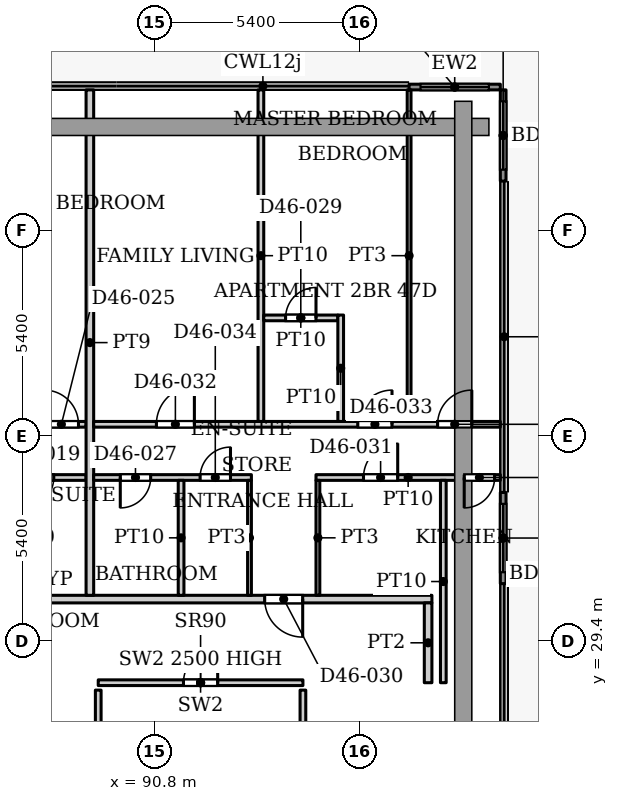
"""IFC4 building model, lengths in metres.
Left out: names, types, materials, properties, quantities, classifications, styles, units other than length and angle.
Written with IfcOpenShell. Run it as: python <this file> out.ifc"""

import sys

from ifc_helpers import new_model, si_unit, direction, frame, frame_2d, origin, place, context, subcontext, project, spatial, rectangle, extrude, source, transform, mapped, element, fill, save


model = new_model("IFC4")
c1 = context("Model", 3, precision=1e-05, world=origin(), true_north=direction((0.0, 1.0)))
c2 = subcontext(c1, "Body", "Model", "MODEL_VIEW")
j1 = project(units=[si_unit("LENGTHUNIT", "METRE"), si_unit("PLANEANGLEUNIT", "RADIAN")], contexts=[c1])
p1 = place(None, origin())
s1 = spatial("IfcSite", under=j1, at=p1, CompositionType="ELEMENT")
p2 = place(p1, origin())
s2 = spatial("IfcBuilding", under=s1, at=p2, CompositionType="ELEMENT")
p3 = place(p2, frame((0.0, 0.0, 199.4)))
s3 = spatial("IfcBuildingStorey", under=s2, at=p3, CompositionType="ELEMENT", Elevation=199.4)
p4 = place(p3, frame((97.5, 43.975, 0.0), z_axis=(0.0, 0.0, 1.0), x_axis=(1.0, 0.0, 0.0)))
e1 = element("IfcWall", 1, at=p4, inside=s3, PredefinedType="SOLIDWALL", context=c2, shape_type="SweptSolid", body=[
    extrude(rectangle(XDim=2.4, YDim=0.15, at=frame_2d((1.2, 0.0))), origin(), (0.0, 0.0, 1.0), 3.75),
])
p5 = place(p4, frame((0.3, 0.0, 0.0)))
e2 = element("IfcOpeningElement", 2, at=p5, cuts=e1, PredefinedType="OPENING", context=c2, shape_type="SweptSolid", body=[
    extrude(rectangle(XDim=1.8, YDim=2.4, at=frame_2d((0.9, 1.2))), frame((0.0, 0.085, 0.0), z_axis=(0.0, -1.0, 0.0), x_axis=(1.0, 0.0, 0.0)), (0.0, 0.0, 1.0), 0.17),
])
p6 = place(p3, frame((99.975, 43.9, 0.0), z_axis=(0.0, 0.0, 1.0), x_axis=(0.0, -1.0, 0.0)))
e3 = element("IfcWall", 3, at=p6, inside=s3, PredefinedType="SOLIDWALL", context=c2, shape_type="SweptSolid", body=[
    extrude(rectangle(XDim=2.4, YDim=0.15, at=frame_2d((1.2, 0.0))), origin(), (0.0, 0.0, 1.0), 3.75),
])
p7 = place(p6, frame((0.3, 0.0, 0.0)))
e4 = element("IfcOpeningElement", 4, at=p7, cuts=e3, PredefinedType="OPENING", context=c2, shape_type="SweptSolid", body=[
    extrude(rectangle(XDim=1.8, YDim=2.4, at=frame_2d((0.9, 1.2))), frame((0.0, 0.085, 0.0), z_axis=(0.0, -1.0, 0.0), x_axis=(1.0, 0.0, 0.0)), (0.0, 0.0, 1.0), 0.17),
])
p8 = place(p3, frame((99.975, 33.307, 0.0), z_axis=(0.0, 0.0, 1.0), x_axis=(0.0, -1.0, 0.0)))
e5 = element("IfcWall", 5, at=p8, inside=s3, PredefinedType="SOLIDWALL", context=c2, shape_type="SweptSolid", body=[
    extrude(rectangle(XDim=2.4, YDim=0.15, at=frame_2d((1.2, 0.0))), origin(), (0.0, 0.0, 1.0), 3.75),
])
p9 = place(p8, frame((0.3, 0.0, 0.0)))
e6 = element("IfcOpeningElement", 6, at=p9, cuts=e5, PredefinedType="OPENING", context=c2, shape_type="SweptSolid", body=[
    extrude(rectangle(XDim=1.8, YDim=2.4, at=frame_2d((0.9, 1.2))), frame((0.0, 0.085, 0.0), z_axis=(0.0, -1.0, 0.0), x_axis=(1.0, 0.0, 0.0)), (0.0, 0.0, 1.0), 0.17),
])
p10 = place(p3, frame((89.32, 28.3, 0.0), z_axis=(0.0, 0.0, 1.0), x_axis=(1.0, 0.0, 0.0)))
e7 = element("IfcWall", 7, at=p10, inside=s3, PredefinedType="PARTITIONING", context=c2, shape_type="SweptSolid", body=[
    extrude(rectangle(XDim=5.386, YDim=0.15, at=frame_2d((2.693, 0.0))), origin(), (0.0, 0.0, 1.0), 2.5),
])
p11 = place(p10, frame((2.243, 0.0, 0.0)))
e8 = element("IfcOpeningElement", 8, at=p11, cuts=e7, PredefinedType="OPENING", context=c2, shape_type="SweptSolid", body=[
    extrude(rectangle(XDim=0.9, YDim=2.2, at=frame_2d((0.45, 1.1))), frame((0.0, 0.085, 0.0), z_axis=(0.0, -1.0, 0.0), x_axis=(1.0, 0.0, 0.0)), (0.0, 0.0, 1.0), 0.17),
])
p12 = place(p3, frame((89.32, 25.62, 0.0), z_axis=(0.0, 0.0, 1.0), x_axis=(0.0, 1.0, 0.0)))
e9 = element("IfcWall", 9, at=p12, inside=s3, PredefinedType="PARTITIONING", context=c2, shape_type="SweptSolid", body=[
    extrude(rectangle(XDim=2.485, YDim=0.15, at=frame_2d((1.242, 0.0))), origin(), (0.0, 0.0, 1.0), 3.9),
])
p13 = place(p3, frame((94.706, 21.287, 0.0), z_axis=(0.0, 0.0, 1.0), x_axis=(0.0, 1.0, 0.0)))
e10 = element("IfcWall", 10, at=p13, inside=s3, PredefinedType="PARTITIONING", context=c2, shape_type="SweptSolid", body=[
    extrude(rectangle(XDim=6.818, YDim=0.15, at=frame_2d((3.409, 0.0))), origin(), (0.0, 0.0, 1.0), 3.9),
])
p14 = place(p3, frame((53.549, 30.5, 0.0), z_axis=(0.0, 0.0, 1.0), x_axis=(1.0, 0.0, 0.0)))
e11 = element("IfcWall", 11, at=p14, inside=s3, PredefinedType="PARTITIONING", context=c2, shape_type="SweptSolid", body=[
    extrude(rectangle(XDim=44.551, YDim=0.2, at=frame_2d((22.275, 0.0))), origin(), (0.0, 0.0, 1.0), 3.6),
])
p15 = place(p14, frame((5.501, 0.0, 0.0)))
e12 = element("IfcOpeningElement", 12, at=p15, cuts=e11, PredefinedType="OPENING", context=c2, shape_type="SweptSolid", body=[
    extrude(rectangle(XDim=1.0, YDim=2.1, at=frame_2d((0.5, 1.05))), frame((0.0, 0.11, 0.0), z_axis=(0.0, -1.0, 0.0), x_axis=(1.0, 0.0, 0.0)), (0.0, 0.0, 1.0), 0.22),
])
p16 = place(p14, frame((20.201, 0.0, 0.0)))
e13 = element("IfcOpeningElement", 13, at=p16, cuts=e11, PredefinedType="OPENING", context=c2, shape_type="SweptSolid", body=[
    extrude(rectangle(XDim=1.0, YDim=2.1, at=frame_2d((0.5, 1.05))), frame((0.0, 0.11, 0.0), z_axis=(0.0, -1.0, 0.0), x_axis=(1.0, 0.0, 0.0)), (0.0, 0.0, 1.0), 0.22),
])
p17 = place(p14, frame((24.251, 0.0, 0.0)))
e14 = element("IfcOpeningElement", 14, at=p17, cuts=e11, PredefinedType="OPENING", context=c2, shape_type="SweptSolid", body=[
    extrude(rectangle(XDim=1.0, YDim=2.1, at=frame_2d((0.5, 1.05))), frame((0.0, 0.11, 0.0), z_axis=(0.0, -1.0, 0.0), x_axis=(1.0, 0.0, 0.0)), (0.0, 0.0, 1.0), 0.22),
])
p18 = place(p14, frame((40.151, 0.0, 0.0)))
e15 = element("IfcOpeningElement", 15, at=p18, cuts=e11, PredefinedType="OPENING", context=c2, shape_type="SweptSolid", body=[
    extrude(rectangle(XDim=1.0, YDim=2.1, at=frame_2d((0.5, 1.05))), frame((0.0, 0.11, 0.0), z_axis=(0.0, -1.0, 0.0), x_axis=(1.0, 0.0, 0.0)), (0.0, 0.0, 1.0), 0.22),
])
p19 = place(p3, frame((77.2, 35.1, 0.0), z_axis=(0.0, 0.0, 1.0), x_axis=(1.0, 0.0, 0.0)))
e16 = element("IfcWall", 16, at=p19, inside=s3, PredefinedType="PARTITIONING", context=c2, shape_type="SweptSolid", body=[
    extrude(rectangle(XDim=11.8, YDim=0.15, at=frame_2d((5.9, 0.0))), origin(), (0.0, 0.0, 1.0), 3.6),
])
p20 = place(p19, frame((6.2, 0.0, 0.0)))
e17 = element("IfcOpeningElement", 17, at=p20, cuts=e16, PredefinedType="OPENING", context=c2, shape_type="SweptSolid", body=[
    extrude(rectangle(XDim=0.9, YDim=2.1, at=frame_2d((0.45, 1.05))), frame((0.0, 0.085, 0.0), z_axis=(0.0, -1.0, 0.0), x_axis=(1.0, 0.0, 0.0)), (0.0, 0.0, 1.0), 0.17),
])
p21 = place(p19, frame((1.95, 0.0, 0.0)))
e18 = element("IfcOpeningElement", 18, at=p21, cuts=e16, PredefinedType="OPENING", context=c2, shape_type="SweptSolid", body=[
    extrude(rectangle(XDim=1.0, YDim=2.1, at=frame_2d((0.5, 1.05))), frame((0.0, 0.085, 0.0), z_axis=(0.0, -1.0, 0.0), x_axis=(1.0, 0.0, 0.0)), (0.0, 0.0, 1.0), 0.17),
])
p22 = place(p19, frame((10.7, 0.0, 0.0)))
e19 = element("IfcOpeningElement", 19, at=p22, cuts=e16, PredefinedType="OPENING", context=c2, shape_type="SweptSolid", body=[
    extrude(rectangle(XDim=0.9, YDim=2.1, at=frame_2d((0.45, 1.05))), frame((0.0, 0.085, 0.0), z_axis=(0.0, -1.0, 0.0), x_axis=(1.0, 0.0, 0.0)), (0.0, 0.0, 1.0), 0.17),
])
p23 = place(p3, frame((80.05, 33.7, 0.0), z_axis=(0.0, 0.0, 1.0), x_axis=(1.0, 0.0, 0.0)))
e20 = element("IfcWall", 20, at=p23, inside=s3, PredefinedType="PARTITIONING", context=c2, shape_type="SweptSolid", body=[
    extrude(rectangle(XDim=8.95, YDim=0.15, at=frame_2d((4.475, 0.0))), origin(), (0.0, 0.0, 1.0), 3.6),
])
p24 = place(p23, frame((7.3, 0.0, 0.0)))
e21 = element("IfcOpeningElement", 21, at=p24, cuts=e20, PredefinedType="OPENING", context=c2, shape_type="SweptSolid", body=[
    extrude(rectangle(XDim=0.8, YDim=2.1, at=frame_2d((0.4, 1.05))), frame((0.0, 0.085, 0.0), z_axis=(0.0, -1.0, 0.0), x_axis=(1.0, 0.0, 0.0)), (0.0, 0.0, 1.0), 0.17),
])
p25 = place(p23, frame((1.6, 0.0, 0.0)))
e22 = element("IfcOpeningElement", 22, at=p25, cuts=e20, PredefinedType="OPENING", context=c2, shape_type="SweptSolid", body=[
    extrude(rectangle(XDim=0.9, YDim=2.1, at=frame_2d((0.45, 1.05))), frame((0.0, 0.085, 0.0), z_axis=(0.0, -1.0, 0.0), x_axis=(1.0, 0.0, 0.0)), (0.0, 0.0, 1.0), 0.17),
])
p26 = place(p23, frame((4.9, 0.0, 0.0)))
e23 = element("IfcOpeningElement", 23, at=p26, cuts=e20, PredefinedType="OPENING", context=c2, shape_type="SweptSolid", body=[
    extrude(rectangle(XDim=0.8, YDim=2.1, at=frame_2d((0.4, 1.05))), frame((0.0, 0.085, 0.0), z_axis=(0.0, -1.0, 0.0), x_axis=(1.0, 0.0, 0.0)), (0.0, 0.0, 1.0), 0.17),
])
p27 = place(p3, frame((89.1, 30.6, 0.0), z_axis=(0.0, 0.0, 1.0), x_axis=(0.0, 1.0, 0.0)))
e24 = element("IfcWall", 24, at=p27, inside=s3, PredefinedType="PARTITIONING", context=c2, shape_type="SweptSolid", body=[
    extrude(rectangle(XDim=13.3, YDim=0.2, at=frame_2d((6.65, 0.0))), origin(), (0.0, 0.0, 1.0), 3.6),
])
p28 = place(p3, frame((89.2, 33.7, 0.0), z_axis=(0.0, 0.0, 1.0), x_axis=(1.0, 0.0, 0.0)))
e25 = element("IfcWall", 25, at=p28, inside=s3, PredefinedType="PARTITIONING", context=c2, shape_type="SweptSolid", body=[
    extrude(rectangle(XDim=4.15, YDim=0.15, at=frame_2d((2.075, 0.0))), origin(), (0.0, 0.0, 1.0), 3.6),
])
p29 = place(p28, frame((0.7, 0.0, 0.0)))
e26 = element("IfcOpeningElement", 26, at=p29, cuts=e25, PredefinedType="OPENING", context=c2, shape_type="SweptSolid", body=[
    extrude(rectangle(XDim=0.8, YDim=2.1, at=frame_2d((0.4, 1.05))), frame((0.0, 0.085, 0.0), z_axis=(0.0, -1.0, 0.0), x_axis=(1.0, 0.0, 0.0)), (0.0, 0.0, 1.0), 0.17),
])
p30 = place(p28, frame((2.8, 0.0, 0.0)))
e27 = element("IfcOpeningElement", 27, at=p30, cuts=e25, PredefinedType="OPENING", context=c2, shape_type="SweptSolid", body=[
    extrude(rectangle(XDim=0.8, YDim=2.1, at=frame_2d((0.4, 1.05))), frame((0.0, 0.085, 0.0), z_axis=(0.0, -1.0, 0.0), x_axis=(1.0, 0.0, 0.0)), (0.0, 0.0, 1.0), 0.17),
])
p31 = place(p3, frame((89.2, 35.1, 0.0), z_axis=(0.0, 0.0, 1.0), x_axis=(1.0, 0.0, 0.0)))
e28 = element("IfcWall", 28, at=p31, inside=s3, PredefinedType="PARTITIONING", context=c2, shape_type="SweptSolid", body=[
    extrude(rectangle(XDim=10.7, YDim=0.15, at=frame_2d((5.35, 0.0))), origin(), (0.0, 0.0, 1.0), 3.6),
])
p32 = place(p31, frame((9.05, 0.0, 0.0)))
e29 = element("IfcOpeningElement", 29, at=p32, cuts=e28, PredefinedType="OPENING", context=c2, shape_type="SweptSolid", body=[
    extrude(rectangle(XDim=0.9, YDim=2.1, at=frame_2d((0.45, 1.05))), frame((0.0, 0.085, 0.0), z_axis=(0.0, -1.0, 0.0), x_axis=(1.0, 0.0, 0.0)), (0.0, 0.0, 1.0), 0.17),
])
p33 = place(p31, frame((1.65, 0.0, 0.0)))
e30 = element("IfcOpeningElement", 30, at=p33, cuts=e28, PredefinedType="OPENING", context=c2, shape_type="SweptSolid", body=[
    extrude(rectangle(XDim=1.0, YDim=2.1, at=frame_2d((0.5, 1.05))), frame((0.0, 0.085, 0.0), z_axis=(0.0, -1.0, 0.0), x_axis=(1.0, 0.0, 0.0)), (0.0, 0.0, 1.0), 0.17),
])
p34 = place(p31, frame((6.95, 0.0, 0.0)))
e31 = element("IfcOpeningElement", 31, at=p34, cuts=e28, PredefinedType="OPENING", context=c2, shape_type="SweptSolid", body=[
    extrude(rectangle(XDim=0.9, YDim=2.1, at=frame_2d((0.45, 1.05))), frame((0.0, 0.085, 0.0), z_axis=(0.0, -1.0, 0.0), x_axis=(1.0, 0.0, 0.0)), (0.0, 0.0, 1.0), 0.17),
])
p35 = place(p3, frame((91.5, 30.6, 0.0), z_axis=(0.0, 0.0, 1.0), x_axis=(0.0, 1.0, 0.0)))
e32 = element("IfcWall", 32, at=p35, inside=s3, PredefinedType="PARTITIONING", context=c2, shape_type="SweptSolid", body=[
    extrude(rectangle(XDim=3.025, YDim=0.15, at=frame_2d((1.512, 0.0))), origin(), (0.0, 0.0, 1.0), 3.6),
])
p36 = place(p3, frame((93.3, 30.6, 0.0), z_axis=(0.0, 0.0, 1.0), x_axis=(0.0, 1.0, 0.0)))
e33 = element("IfcWall", 33, at=p36, inside=s3, PredefinedType="PARTITIONING", context=c2, shape_type="SweptSolid", body=[
    extrude(rectangle(XDim=3.025, YDim=0.1, at=frame_2d((1.512, 0.0))), origin(), (0.0, 0.0, 1.0), 3.6),
])
p37 = place(p3, frame((93.6, 35.175, 0.0), z_axis=(0.0, 0.0, 1.0), x_axis=(0.0, 1.0, 0.0)))
e34 = element("IfcWall", 34, at=p37, inside=s3, PredefinedType="PARTITIONING", context=c2, shape_type="SweptSolid", body=[
    extrude(rectangle(XDim=8.725, YDim=0.15, at=frame_2d((4.362, 0.0))), origin(), (0.0, 0.0, 1.0), 3.6),
])
p38 = place(p3, frame((93.675, 37.9, 0.0), z_axis=(0.0, 0.0, 1.0), x_axis=(1.0, 0.0, 0.0)))
e35 = element("IfcWall", 35, at=p38, inside=s3, PredefinedType="PARTITIONING", context=c2, shape_type="SweptSolid", body=[
    extrude(rectangle(XDim=1.95, YDim=0.15, at=frame_2d((0.975, 0.0))), origin(), (0.0, 0.0, 1.0), 3.6),
])
p39 = place(p38, frame((0.575, 0.0, 0.0)))
e36 = element("IfcOpeningElement", 36, at=p39, cuts=e35, PredefinedType="OPENING", context=c2, shape_type="SweptSolid", body=[
    extrude(rectangle(XDim=0.8, YDim=2.1, at=frame_2d((0.4, 1.05))), frame((0.0, 0.085, 0.0), z_axis=(0.0, -1.0, 0.0), x_axis=(1.0, 0.0, 0.0)), (0.0, 0.0, 1.0), 0.17),
])
p40 = place(p3, frame((95.05, 33.7, 0.0), z_axis=(0.0, 0.0, 1.0), x_axis=(1.0, 0.0, 0.0)))
e37 = element("IfcWall", 37, at=p40, inside=s3, PredefinedType="PARTITIONING", context=c2, shape_type="SweptSolid", body=[
    extrude(rectangle(XDim=4.85, YDim=0.15, at=frame_2d((2.425, 0.0))), origin(), (0.0, 0.0, 1.0), 3.6),
])
p41 = place(p40, frame((1.25, 0.0, 0.0)))
e38 = element("IfcOpeningElement", 38, at=p41, cuts=e37, PredefinedType="OPENING", context=c2, shape_type="SweptSolid", body=[
    extrude(rectangle(XDim=0.9, YDim=2.1, at=frame_2d((0.45, 1.05))), frame((0.0, 0.085, 0.0), z_axis=(0.0, -1.0, 0.0), x_axis=(1.0, 0.0, 0.0)), (0.0, 0.0, 1.0), 0.17),
])
p42 = place(p40, frame((3.9, 0.0, 0.0)))
e39 = element("IfcOpeningElement", 39, at=p42, cuts=e37, PredefinedType="OPENING", context=c2, shape_type="SweptSolid", body=[
    extrude(rectangle(XDim=0.8, YDim=2.1, at=frame_2d((0.4, 1.05))), frame((0.0, 0.085, 0.0), z_axis=(0.0, -1.0, 0.0), x_axis=(1.0, 0.0, 0.0)), (0.0, 0.0, 1.0), 0.17),
])
p43 = place(p3, frame((95.1, 30.6, 0.0), z_axis=(0.0, 0.0, 1.0), x_axis=(0.0, 1.0, 0.0)))
e40 = element("IfcWall", 40, at=p43, inside=s3, PredefinedType="PARTITIONING", context=c2, shape_type="SweptSolid", body=[
    extrude(rectangle(XDim=3.025, YDim=0.1, at=frame_2d((1.512, 0.0))), origin(), (0.0, 0.0, 1.0), 3.6),
])
p44 = place(p3, frame((95.7, 35.175, 0.0), z_axis=(0.0, 0.0, 1.0), x_axis=(0.0, 1.0, 0.0)))
e41 = element("IfcWall", 41, at=p44, inside=s3, PredefinedType="PARTITIONING", context=c2, shape_type="SweptSolid", body=[
    extrude(rectangle(XDim=2.8, YDim=0.15, at=frame_2d((1.4, 0.0))), origin(), (0.0, 0.0, 1.0), 3.6),
])
p45 = place(p3, frame((97.5, 35.175, 0.0), z_axis=(0.0, 0.0, 1.0), x_axis=(0.0, 1.0, 0.0)))
e42 = element("IfcWall", 42, at=p45, inside=s3, PredefinedType="PARTITIONING", context=c2, shape_type="SweptSolid", body=[
    extrude(rectangle(XDim=8.725, YDim=0.1, at=frame_2d((4.362, 0.0))), origin(), (0.0, 0.0, 1.0), 3.6),
])
p46 = place(p3, frame((98.0, 28.3, 0.0), z_axis=(0.0, 0.0, 1.0), x_axis=(0.0, 1.0, 0.0)))
e43 = element("IfcWall", 43, at=p46, inside=s3, PredefinedType="PARTITIONING", context=c2, shape_type="SweptSolid", body=[
    extrude(rectangle(XDim=2.1, YDim=0.2, at=frame_2d((1.05, 0.0))), origin(), (0.0, 0.0, 1.0), 3.6),
])
p47 = place(p3, frame((98.4, 28.3, 0.0), z_axis=(0.0, 0.0, 1.0), x_axis=(0.0, 1.0, 0.0)))
e44 = element("IfcWall", 44, at=p47, inside=s3, PredefinedType="PARTITIONING", context=c2, shape_type="SweptSolid", body=[
    extrude(rectangle(XDim=5.325, YDim=0.15, at=frame_2d((2.663, 0.0))), origin(), (0.0, 0.0, 1.0), 3.6),
])
m1 = source(origin(), c2, "Body", "SweptSolid", [
    extrude(rectangle(XDim=1.8, YDim=2.4, at=frame_2d((0.9, 1.2))), frame((0.0, 0.025, 0.0), z_axis=(0.0, -1.0, 0.0), x_axis=(1.0, 0.0, 0.0)), (0.0, 0.0, 1.0), 0.05),
])
p48 = place(p5, origin())
e45 = element("IfcDoor", 45, at=p48, inside=s3, OperationType="SLIDING_TO_LEFT", PredefinedType="DOOR", context=c2, shape_type="MappedRepresentation", body=[
    mapped(m1, transform((0.0, 0.0, 0.0), x_axis=(1.0, 0.0, 0.0), y_axis=(0.0, 1.0, 0.0), z_axis=(0.0, 0.0, 1.0), scale=1.0)),
])
fill(e2, e45)
p49 = place(p7, origin())
e46 = element("IfcDoor", 46, at=p49, inside=s3, OperationType="SLIDING_TO_LEFT", PredefinedType="DOOR", context=c2, shape_type="MappedRepresentation", body=[
    mapped(m1, transform((0.0, 0.0, 0.0), x_axis=(1.0, 0.0, 0.0), y_axis=(0.0, 1.0, 0.0), z_axis=(0.0, 0.0, 1.0), scale=1.0)),
])
fill(e4, e46)
p50 = place(p9, origin())
e47 = element("IfcDoor", 47, at=p50, inside=s3, OperationType="SLIDING_TO_LEFT", PredefinedType="DOOR", context=c2, shape_type="MappedRepresentation", body=[
    mapped(m1, transform((0.0, 0.0, 0.0), x_axis=(1.0, 0.0, 0.0), y_axis=(0.0, 1.0, 0.0), z_axis=(0.0, 0.0, 1.0), scale=1.0)),
])
fill(e6, e47)
m2 = source(origin(), c2, "Body", "SweptSolid", [
    extrude(rectangle(XDim=0.9, YDim=2.2, at=frame_2d((0.45, 1.1))), frame((0.0, 0.025, 0.0), z_axis=(0.0, -1.0, 0.0), x_axis=(1.0, 0.0, 0.0)), (0.0, 0.0, 1.0), 0.05),
])
p51 = place(p11, origin())
e48 = element("IfcDoor", 48, at=p51, inside=s3, OperationType="SINGLE_SWING_LEFT", PredefinedType="DOOR", context=c2, shape_type="MappedRepresentation", body=[
    mapped(m2, transform((0.0, 0.0, 0.0), x_axis=(1.0, 0.0, 0.0), y_axis=(0.0, 1.0, 0.0), z_axis=(0.0, 0.0, 1.0), scale=1.0)),
])
fill(e8, e48)
m3 = source(origin(), c2, "Body", "SweptSolid", [
    extrude(rectangle(XDim=0.8, YDim=2.1, at=frame_2d((0.4, 1.05))), frame((0.0, 0.025, 0.0), z_axis=(0.0, -1.0, 0.0), x_axis=(1.0, 0.0, 0.0)), (0.0, 0.0, 1.0), 0.05),
])
p52 = place(p24, origin())
e49 = element("IfcDoor", 49, at=p52, inside=s3, OperationType="SINGLE_SWING_RIGHT", PredefinedType="DOOR", context=c2, shape_type="MappedRepresentation", body=[
    mapped(m3, transform((0.0, 0.0, 0.0), x_axis=(1.0, 0.0, 0.0), y_axis=(0.0, 1.0, 0.0), z_axis=(0.0, 0.0, 1.0), scale=1.0)),
])
fill(e21, e49)
m4 = source(origin(), c2, "Body", "SweptSolid", [
    extrude(rectangle(XDim=0.9, YDim=2.1, at=frame_2d((0.45, 1.05))), frame((0.0, 0.025, 0.0), z_axis=(0.0, -1.0, 0.0), x_axis=(1.0, 0.0, 0.0)), (0.0, 0.0, 1.0), 0.05),
])
p53 = place(p22, origin())
e50 = element("IfcDoor", 50, at=p53, inside=s3, OperationType="SINGLE_SWING_LEFT", PredefinedType="DOOR", context=c2, shape_type="MappedRepresentation", body=[
    mapped(m4, transform((0.0, 0.0, 0.0), x_axis=(1.0, 0.0, 0.0), y_axis=(0.0, 1.0, 0.0), z_axis=(0.0, 0.0, 1.0), scale=1.0)),
])
fill(e19, e50)
p54 = place(p29, origin())
e51 = element("IfcDoor", 51, at=p54, inside=s3, OperationType="SINGLE_SWING_RIGHT", PredefinedType="DOOR", context=c2, shape_type="MappedRepresentation", body=[
    mapped(m3, transform((0.0, 0.0, 0.0), x_axis=(1.0, 0.0, 0.0), y_axis=(0.0, 1.0, 0.0), z_axis=(0.0, 0.0, 1.0), scale=1.0)),
])
fill(e26, e51)
p55 = place(p32, origin())
e52 = element("IfcDoor", 52, at=p55, inside=s3, OperationType="SINGLE_SWING_LEFT", PredefinedType="DOOR", context=c2, shape_type="MappedRepresentation", body=[
    mapped(m4, transform((0.0, 0.0, 0.0), x_axis=(1.0, 0.0, 0.0), y_axis=(0.0, 1.0, 0.0), z_axis=(0.0, 0.0, 1.0), scale=1.0)),
])
fill(e29, e52)
p56 = place(p39, origin())
e53 = element("IfcDoor", 53, at=p56, inside=s3, OperationType="SINGLE_SWING_LEFT", PredefinedType="DOOR", context=c2, shape_type="MappedRepresentation", body=[
    mapped(m3, transform((0.0, 0.0, 0.0), x_axis=(1.0, 0.0, 0.0), y_axis=(0.0, 1.0, 0.0), z_axis=(0.0, 0.0, 1.0), scale=1.0)),
])
fill(e36, e53)
m5 = source(origin(), c2, "Body", "SweptSolid", [
    extrude(rectangle(XDim=1.0, YDim=2.1, at=frame_2d((0.5, 1.05))), frame((0.0, 0.025, 0.0), z_axis=(0.0, -1.0, 0.0), x_axis=(1.0, 0.0, 0.0)), (0.0, 0.0, 1.0), 0.05),
])
p57 = place(p18, origin())
e54 = element("IfcDoor", 54, at=p57, inside=s3, OperationType="SINGLE_SWING_RIGHT", PredefinedType="DOOR", context=c2, shape_type="MappedRepresentation", body=[
    mapped(m5, transform((0.0, 0.0, 0.0), x_axis=(1.0, 0.0, 0.0), y_axis=(0.0, 1.0, 0.0), z_axis=(0.0, 0.0, 1.0), scale=1.0)),
])
fill(e15, e54)
p58 = place(p41, origin())
e55 = element("IfcDoor", 55, at=p58, inside=s3, OperationType="SINGLE_SWING_LEFT", PredefinedType="DOOR", context=c2, shape_type="MappedRepresentation", body=[
    mapped(m4, transform((0.0, 0.0, 0.0), x_axis=(1.0, 0.0, 0.0), y_axis=(0.0, 1.0, 0.0), z_axis=(0.0, 0.0, 1.0), scale=1.0)),
])
fill(e38, e55)
m6 = source(origin(), c2, "Body", "SweptSolid", [
    extrude(rectangle(XDim=1.0, YDim=2.1, at=frame_2d((0.5, 1.05))), frame((0.0, 0.025, 0.0), z_axis=(0.0, -1.0, 0.0), x_axis=(1.0, 0.0, 0.0)), (0.0, 0.0, 1.0), 0.05),
])
p59 = place(p33, origin())
e56 = element("IfcDoor", 56, at=p59, inside=s3, OperationType="SINGLE_SWING_LEFT", PredefinedType="DOOR", context=c2, shape_type="MappedRepresentation", body=[
    mapped(m6, transform((0.0, 0.0, 0.0), x_axis=(1.0, 0.0, 0.0), y_axis=(0.0, 1.0, 0.0), z_axis=(0.0, 0.0, 1.0), scale=1.0)),
])
fill(e30, e56)
p60 = place(p34, origin())
e57 = element("IfcDoor", 57, at=p60, inside=s3, OperationType="SINGLE_SWING_LEFT", PredefinedType="DOOR", context=c2, shape_type="MappedRepresentation", body=[
    mapped(m4, transform((0.0, 0.0, 0.0), x_axis=(1.0, 0.0, 0.0), y_axis=(0.0, 1.0, 0.0), z_axis=(0.0, 0.0, 1.0), scale=1.0)),
])
fill(e31, e57)
p61 = place(p30, origin())
e58 = element("IfcDoor", 58, at=p61, inside=s3, OperationType="SINGLE_SWING_LEFT", PredefinedType="DOOR", context=c2, shape_type="MappedRepresentation", body=[
    mapped(m3, transform((0.0, 0.0, 0.0), x_axis=(1.0, 0.0, 0.0), y_axis=(0.0, 1.0, 0.0), z_axis=(0.0, 0.0, 1.0), scale=1.0)),
])
fill(e27, e58)
p62 = place(p42, origin())
e59 = element("IfcDoor", 59, at=p62, inside=s3, OperationType="SINGLE_SWING_RIGHT", PredefinedType="DOOR", context=c2, shape_type="MappedRepresentation", body=[
    mapped(m3, transform((0.0, 0.0, 0.0), x_axis=(1.0, 0.0, 0.0), y_axis=(0.0, 1.0, 0.0), z_axis=(0.0, 0.0, 1.0), scale=1.0)),
])
fill(e39, e59)
save(model, sys.argv[1])
